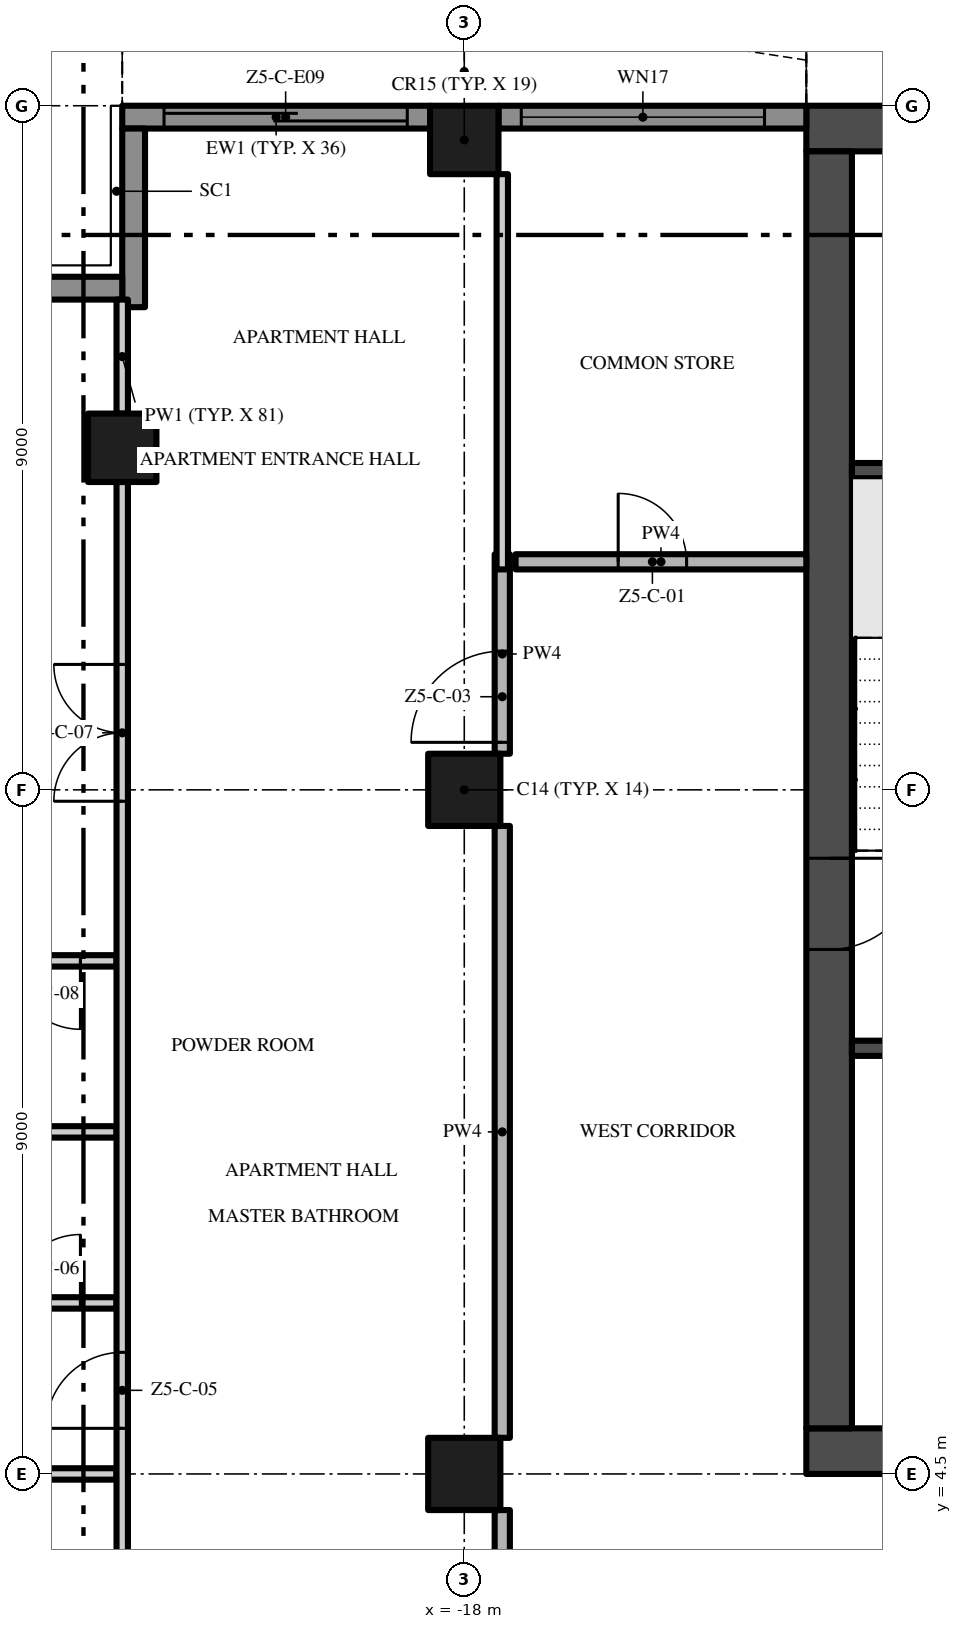
"""IFC4 building model, lengths in metres.
Left out: names, types, materials, properties, quantities, classifications, styles, units other than length and angle.
Written with IfcOpenShell. Run it as: python <this file> out.ifc"""

import sys

from ifc_helpers import new_model, si_unit, direction, frame, frame_2d, origin, origin_2d, place, context, subcontext, project, spatial, polyline, rectangle, outline, extrude, element, fill, save


model = new_model("IFC4")
c1 = context("Model", 3, precision=1e-05, world=origin(), true_north=direction((0.0, 1.0)))
c2 = subcontext(c1, "Body", "Model", "MODEL_VIEW")
j1 = project(units=[si_unit("LENGTHUNIT", "METRE"), si_unit("PLANEANGLEUNIT", "RADIAN")], contexts=[c1])
p1 = place(None, origin())
s1 = spatial("IfcSite", under=j1, at=p1, CompositionType="ELEMENT")
p2 = place(p1, origin())
s2 = spatial("IfcBuilding", under=s1, at=p2, CompositionType="ELEMENT")
p3 = place(p2, frame((0.0, 0.0, 265.4)))
s3 = spatial("IfcBuildingStorey", under=s2, at=p3, CompositionType="ELEMENT", Elevation=265.4)
p4 = place(p3, frame((-13.5, 4.8, -0.3), z_axis=(0.0, 0.0, 1.0), x_axis=(1.0, 0.0, 0.0)))
e1 = element("IfcWall", 1, at=p4, inside=s3, PredefinedType="SHEAR", context=c2, shape_type="SweptSolid", body=[
    extrude(rectangle(XDim=27.0, YDim=0.6, at=frame_2d((13.5, 0.0))), origin(), (0.0, 0.0, 1.0), 3.8),
])
p5 = place(p4, frame((12.0, 0.0, 0.3)))
e2 = element("IfcOpeningElement", 2, at=p5, cuts=e1, PredefinedType="OPENING", context=c2, shape_type="SweptSolid", body=[
    extrude(rectangle(XDim=3.0, YDim=2.4, at=frame_2d((1.5, 1.2))), frame((0.0, 0.31, 0.0), z_axis=(0.0, -1.0, 0.0), x_axis=(1.0, 0.0, 0.0)), (0.0, 0.0, 1.0), 0.62),
])
p6 = place(p4, frame((4.9, 0.0, 0.3)))
e3 = element("IfcOpeningElement", 3, at=p6, cuts=e1, PredefinedType="OPENING", context=c2, shape_type="SweptSolid", body=[
    extrude(rectangle(XDim=1.2, YDim=2.2, at=frame_2d((0.6, 1.1))), frame((0.0, 0.31, 0.0), z_axis=(0.0, -1.0, 0.0), x_axis=(1.0, 0.0, 0.0)), (0.0, 0.0, 1.0), 0.62),
])
p7 = place(p4, frame((20.75, 0.0, 0.3)))
e4 = element("IfcOpeningElement", 4, at=p7, cuts=e1, PredefinedType="OPENING", context=c2, shape_type="SweptSolid", body=[
    extrude(rectangle(XDim=1.5, YDim=2.2, at=frame_2d((0.75, 1.1))), frame((0.0, 0.31, 0.0), z_axis=(0.0, -1.0, 0.0), x_axis=(1.0, 0.0, 0.0)), (0.0, 0.0, 1.0), 0.62),
])
p8 = place(p4, frame((17.4, 0.0, 0.3)))
e5 = element("IfcOpeningElement", 5, at=p8, cuts=e1, PredefinedType="OPENING", context=c2, shape_type="SweptSolid", body=[
    extrude(rectangle(XDim=1.2, YDim=2.2, at=frame_2d((0.6, 1.1))), frame((0.0, 0.31, 0.0), z_axis=(0.0, -1.0, 0.0), x_axis=(1.0, 0.0, 0.0)), (0.0, 0.0, 1.0), 0.62),
])
p9 = place(p3, frame((13.5, 22.2, -0.3), z_axis=(0.0, 0.0, 1.0), x_axis=(-1.0, 0.0, 0.0)))
e6 = element("IfcWall", 6, at=p9, inside=s3, PredefinedType="SHEAR", context=c2, shape_type="SweptSolid", body=[
    extrude(rectangle(XDim=27.0, YDim=0.6, at=frame_2d((13.5, 0.0))), origin(), (0.0, 0.0, 1.0), 3.8),
])
p10 = place(p3, frame((-13.2, 21.9, -0.3), z_axis=(0.0, 0.0, 1.0), x_axis=(0.0, -1.0, 0.0)))
e7 = element("IfcWall", 7, at=p10, inside=s3, PredefinedType="SHEAR", context=c2, shape_type="SweptSolid", body=[
    extrude(rectangle(XDim=16.8, YDim=0.6, at=frame_2d((8.4, 0.0))), origin(), (0.0, 0.0, 1.0), 3.8),
])
p11 = place(p10, frame((9.3, 0.0, 0.3)))
e8 = element("IfcOpeningElement", 8, at=p11, cuts=e7, PredefinedType="OPENING", context=c2, shape_type="SweptSolid", body=[
    extrude(rectangle(XDim=1.2, YDim=2.2, at=frame_2d((0.6, 1.1))), frame((0.0, 0.31, 0.0), z_axis=(0.0, -1.0, 0.0), x_axis=(1.0, 0.0, 0.0)), (0.0, 0.0, 1.0), 0.62),
])
p12 = place(p3, frame((-18.0, 13.5, 0.0), z_axis=(0.0, 0.0, 1.0), x_axis=(1.0, 0.0, 0.0)))
e9 = element("IfcColumn", 9, at=p12, inside=s3, PredefinedType="COLUMN", context=c2, shape_type="SweptSolid", body=[
    extrude(rectangle(XDim=0.95, YDim=0.95, at=origin_2d()), origin(), (0.0, 0.0, 1.0), 3.5),
])
p13 = place(p3, frame((-18.0, 22.05, 0.0), z_axis=(0.0, 0.0, 1.0), x_axis=(1.0, 0.0, 0.0)))
e10 = element("IfcColumn", 10, at=p13, inside=s3, PredefinedType="COLUMN", context=c2, shape_type="SweptSolid", body=[
    extrude(rectangle(XDim=0.9, YDim=0.9, at=origin_2d()), origin(), (0.0, 0.0, 1.0), 3.5),
])
p14 = place(p3, frame((-18.0, 4.5, 0.0), z_axis=(0.0, 0.0, 1.0), x_axis=(1.0, 0.0, 0.0)))
e11 = element("IfcColumn", 11, at=p14, inside=s3, PredefinedType="COLUMN", context=c2, shape_type="SweptSolid", body=[
    extrude(rectangle(XDim=0.95, YDim=0.95, at=origin_2d()), origin(), (0.0, 0.0, 1.0), 3.5),
])
p15 = place(p3, frame((-22.5, 18.0, 0.0), z_axis=(0.0, 0.0, 1.0), x_axis=(1.0, 0.0, 0.0)))
e12 = element("IfcColumn", 12, at=p15, inside=s3, PredefinedType="COLUMN", context=c2, shape_type="SweptSolid", body=[
    extrude(rectangle(XDim=0.9, YDim=0.9, at=origin_2d()), origin(), (0.0, 0.0, 1.0), 3.5),
])
p16 = place(p3, frame((-17.55, 22.35, 0.0), z_axis=(0.0, 0.0, 1.0), x_axis=(1.0, 0.0, 0.0)))
e13 = element("IfcWall", 13, at=p16, inside=s3, PredefinedType="SOLIDWALL", context=c2, shape_type="SweptSolid", body=[
    extrude(rectangle(XDim=4.05, YDim=0.3, at=frame_2d((2.025, 0.0))), origin(), (0.0, 0.0, 1.0), 3.5),
])
p17 = place(p16, frame((0.3, 0.0, 0.45)))
e14 = element("IfcOpeningElement", 14, at=p17, cuts=e13, PredefinedType="OPENING", context=c2, shape_type="SweptSolid", body=[
    extrude(rectangle(XDim=3.2, YDim=2.65, at=frame_2d((1.6, 1.325))), frame((0.0, 0.16, 0.0), z_axis=(0.0, -1.0, 0.0), x_axis=(1.0, 0.0, 0.0)), (0.0, 0.0, 1.0), 0.32),
])
p18 = place(p3, frame((-22.5, 22.35, 0.0), z_axis=(0.0, 0.0, 1.0), x_axis=(1.0, 0.0, 0.0)))
e15 = element("IfcWall", 15, at=p18, inside=s3, PredefinedType="SOLIDWALL", context=c2, shape_type="SweptSolid", body=[
    extrude(rectangle(XDim=4.05, YDim=0.3, at=frame_2d((2.025, 0.0))), origin(), (0.0, 0.0, 1.0), 3.5),
])
p19 = place(p18, frame((0.55, 0.0, 0.0)))
e16 = element("IfcOpeningElement", 16, at=p19, cuts=e15, PredefinedType="OPENING", context=c2, shape_type="SweptSolid", body=[
    extrude(rectangle(XDim=3.2, YDim=2.4, at=frame_2d((1.6, 1.2))), frame((0.0, 0.16, 0.0), z_axis=(0.0, -1.0, 0.0), x_axis=(1.0, 0.0, 0.0)), (0.0, 0.0, 1.0), 0.32),
])
p20 = place(p3, frame((-22.35, 19.85, 0.0), z_axis=(0.0, 0.0, 1.0), x_axis=(0.0, 1.0, 0.0)))
e17 = element("IfcWall", 17, at=p20, inside=s3, PredefinedType="SOLIDWALL", context=c2, shape_type="SweptSolid", body=[
    extrude(rectangle(XDim=2.35, YDim=0.3, at=frame_2d((1.175, 0.0))), origin(), (0.0, 0.0, 1.0), 3.5),
])
p21 = place(p3, frame((-24.75, 20.1, 0.0), z_axis=(0.0, 0.0, 1.0), x_axis=(1.0, 0.0, 0.0)))
e18 = element("IfcWall", 18, at=p21, inside=s3, PredefinedType="SOLIDWALL", context=c2, shape_type="SweptSolid", body=[
    extrude(rectangle(XDim=2.25, YDim=0.3, at=frame_2d((1.125, 0.0))), origin(), (0.0, 0.0, 1.0), 3.5),
])
p22 = place(p3, origin())
e19 = element("IfcWall", 19, at=p22, inside=s3, PredefinedType="USERDEFINED", context=c2, shape_type="SweptSolid", body=[
    extrude(outline(polyline([(-13.5, 23.1), (-15.0, 23.329), (-16.5, 23.929), (-18.0, 24.671), (-19.5, 25.271), (-21.0, 25.5), (-22.5, 25.271), (-22.462, 25.024), (-21.0, 25.247), (-19.566, 25.028), (-18.102, 24.442), (-16.602, 23.701), (-15.066, 23.086), (-13.538, 22.853), (-13.5, 23.1)])), origin(), (0.0, 0.0, 1.0), 0.9),
])
for number, where, z_axis, x_axis in (
    (20, (-12.9, 10.1, 0.0), (0.0, 0.0, 1.0), (1.0, 0.0, 0.0)),
    (21, (-12.9, 17.7, 0.0), (0.0, 0.0, 1.0), (1.0, 0.0, 0.0)),
):
    element("IfcWall", number, at=place(p3, frame(where, z_axis=z_axis, x_axis=x_axis)), inside=s3, PredefinedType="SHEAR", context=c2, shape_type="SweptSolid", body=[
        extrude(rectangle(XDim=3.25, YDim=0.2, at=frame_2d((1.625, 0.0))), origin(), (0.0, 0.0, 1.0), 3.5),
    ])
p23 = place(p3, frame((-26.1, 4.5, 0.0), z_axis=(0.0, 0.0, 1.0), x_axis=(1.0, 0.0, 0.0)))
e22 = element("IfcWall", 22, at=p23, inside=s3, PredefinedType="PARTITIONING", context=c2, shape_type="SweptSolid", body=[
    extrude(rectangle(XDim=3.525, YDim=0.15, at=frame_2d((1.762, 0.0))), origin(), (0.0, 0.0, 1.0), 3.5),
])
p24 = place(p3, frame((-24.45, 6.75, 0.0), z_axis=(0.0, 0.0, 1.0), x_axis=(1.0, 0.0, 0.0)))
e23 = element("IfcWall", 23, at=p24, inside=s3, PredefinedType="PARTITIONING", context=c2, shape_type="SweptSolid", body=[
    extrude(rectangle(XDim=1.875, YDim=0.15, at=frame_2d((0.938, 0.0))), origin(), (0.0, 0.0, 1.0), 3.5),
])
p25 = place(p24, frame((0.5, 0.0, 0.0)))
e24 = element("IfcOpeningElement", 24, at=p25, cuts=e23, PredefinedType="OPENING", context=c2, shape_type="SweptSolid", body=[
    extrude(rectangle(XDim=0.9, YDim=2.1, at=frame_2d((0.45, 1.05))), frame((0.0, 0.085, 0.0), z_axis=(0.0, -1.0, 0.0), x_axis=(1.0, 0.0, 0.0)), (0.0, 0.0, 1.0), 0.17),
])
p26 = place(p3, frame((-24.45, 9.0, 0.0), z_axis=(0.0, 0.0, 1.0), x_axis=(1.0, 0.0, 0.0)))
e25 = element("IfcWall", 25, at=p26, inside=s3, PredefinedType="PARTITIONING", context=c2, shape_type="SweptSolid", body=[
    extrude(rectangle(XDim=1.875, YDim=0.15, at=frame_2d((0.938, 0.0))), origin(), (0.0, 0.0, 1.0), 3.5),
])
p27 = place(p3, frame((-22.575, 11.25, 0.0), z_axis=(0.0, 0.0, 1.0), x_axis=(-1.0, 0.0, 0.0)))
e26 = element("IfcWall", 26, at=p27, inside=s3, PredefinedType="PARTITIONING", context=c2, shape_type="SweptSolid", body=[
    extrude(rectangle(XDim=1.875, YDim=0.15, at=frame_2d((0.938, 0.0))), origin(), (0.0, 0.0, 1.0), 3.5),
])
p28 = place(p27, frame((0.475, 0.0, 0.0)))
e27 = element("IfcOpeningElement", 27, at=p28, cuts=e26, PredefinedType="OPENING", context=c2, shape_type="SweptSolid", body=[
    extrude(rectangle(XDim=0.9, YDim=2.1, at=frame_2d((0.45, 1.05))), frame((0.0, 0.085, 0.0), z_axis=(0.0, -1.0, 0.0), x_axis=(1.0, 0.0, 0.0)), (0.0, 0.0, 1.0), 0.17),
])
p29 = place(p3, frame((-17.325, 16.5, 0.0), z_axis=(0.0, 0.0, 1.0), x_axis=(1.0, 0.0, 0.0)))
e28 = element("IfcWall", 28, at=p29, inside=s3, PredefinedType="PARTITIONING", context=c2, shape_type="SweptSolid", body=[
    extrude(rectangle(XDim=3.825, YDim=0.2, at=frame_2d((1.913, 0.0))), origin(), (0.0, 0.0, 1.0), 3.5),
])
p30 = place(p29, frame((1.35, 0.0, 0.0)))
e29 = element("IfcOpeningElement", 29, at=p30, cuts=e28, PredefinedType="OPENING", context=c2, shape_type="SweptSolid", body=[
    extrude(rectangle(XDim=0.9, YDim=2.1, at=frame_2d((0.45, 1.05))), frame((0.0, 0.11, 0.0), z_axis=(0.0, -1.0, 0.0), x_axis=(1.0, 0.0, 0.0)), (0.0, 0.0, 1.0), 0.22),
])
p31 = place(p3, frame((-22.5, 0.1, 0.0), z_axis=(0.0, 0.0, 1.0), x_axis=(0.0, 1.0, 0.0)))
e30 = element("IfcWall", 30, at=p31, inside=s3, PredefinedType="PARTITIONING", context=c2, shape_type="SweptSolid", body=[
    extrude(rectangle(XDim=17.45, YDim=0.15, at=frame_2d((8.725, 0.0))), origin(), (0.0, 0.0, 1.0), 3.5),
])
p32 = place(p31, frame((1.65, 0.0, 0.0)))
e31 = element("IfcOpeningElement", 31, at=p32, cuts=e30, PredefinedType="OPENING", context=c2, shape_type="SweptSolid", body=[
    extrude(rectangle(XDim=1.0, YDim=2.4, at=frame_2d((0.5, 1.2))), frame((0.0, 0.085, 0.0), z_axis=(0.0, -1.0, 0.0), x_axis=(1.0, 0.0, 0.0)), (0.0, 0.0, 1.0), 0.17),
])
p33 = place(p31, frame((5.0, 0.0, 0.0)))
e32 = element("IfcOpeningElement", 32, at=p33, cuts=e30, PredefinedType="OPENING", context=c2, shape_type="SweptSolid", body=[
    extrude(rectangle(XDim=1.0, YDim=2.4, at=frame_2d((0.5, 1.2))), frame((0.0, 0.085, 0.0), z_axis=(0.0, -1.0, 0.0), x_axis=(1.0, 0.0, 0.0)), (0.0, 0.0, 1.0), 0.17),
])
p34 = place(p31, frame((13.25, 0.0, 0.0)))
e33 = element("IfcOpeningElement", 33, at=p34, cuts=e30, PredefinedType="OPENING", context=c2, shape_type="SweptSolid", body=[
    extrude(rectangle(XDim=1.8, YDim=2.4, at=frame_2d((0.9, 1.2))), frame((0.0, 0.085, 0.0), z_axis=(0.0, -1.0, 0.0), x_axis=(1.0, 0.0, 0.0)), (0.0, 0.0, 1.0), 0.17),
])
p35 = place(p3, frame((-22.5, 18.45, 0.0), z_axis=(0.0, 0.0, 1.0), x_axis=(0.0, 1.0, 0.0)))
e34 = element("IfcWall", 34, at=p35, inside=s3, PredefinedType="PARTITIONING", context=c2, shape_type="SweptSolid", body=[
    extrude(rectangle(XDim=1.5, YDim=0.15, at=frame_2d((0.75, 0.0))), origin(), (0.0, 0.0, 1.0), 3.5),
])
p36 = place(p3, frame((-17.5, -0.2, 0.0), z_axis=(0.0, 0.0, 1.0), x_axis=(0.0, 1.0, 0.0)))
e35 = element("IfcWall", 35, at=p36, inside=s3, PredefinedType="PARTITIONING", context=c2, shape_type="SweptSolid", body=[
    extrude(rectangle(XDim=4.225, YDim=0.2, at=frame_2d((2.112, 0.0))), origin(), (0.0, 0.0, 1.0), 3.5),
])
p37 = place(p3, frame((-17.5, 4.975, 0.0), z_axis=(0.0, 0.0, 1.0), x_axis=(0.0, 1.0, 0.0)))
e36 = element("IfcWall", 36, at=p37, inside=s3, PredefinedType="PARTITIONING", context=c2, shape_type="SweptSolid", body=[
    extrude(rectangle(XDim=8.05, YDim=0.2, at=frame_2d((4.025, 0.0))), origin(), (0.0, 0.0, 1.0), 3.5),
])
p38 = place(p3, frame((-17.5, 13.975, 0.0), z_axis=(0.0, 0.0, 1.0), x_axis=(0.0, 1.0, 0.0)))
e37 = element("IfcWall", 37, at=p38, inside=s3, PredefinedType="PARTITIONING", context=c2, shape_type="SweptSolid", body=[
    extrude(rectangle(XDim=2.625, YDim=0.2, at=frame_2d((1.312, 0.0))), origin(), (0.0, 0.0, 1.0), 3.5),
])
p39 = place(p38, frame((0.15, 0.0, 0.0)))
e38 = element("IfcOpeningElement", 38, at=p39, cuts=e37, PredefinedType="OPENING", context=c2, shape_type="SweptSolid", body=[
    extrude(rectangle(XDim=1.2, YDim=2.4, at=frame_2d((0.6, 1.2))), frame((0.0, 0.11, 0.0), z_axis=(0.0, -1.0, 0.0), x_axis=(1.0, 0.0, 0.0)), (0.0, 0.0, 1.0), 0.22),
])
p40 = place(p3, frame((-17.5, 16.4, 0.0), z_axis=(0.0, 0.0, 1.0), x_axis=(0.0, 1.0, 0.0)))
e39 = element("IfcWall", 39, at=p40, inside=s3, PredefinedType="PARTITIONING", context=c2, shape_type="SweptSolid", body=[
    extrude(rectangle(XDim=5.2, YDim=0.15, at=frame_2d((2.6, 0.0))), origin(), (0.0, 0.0, 1.0), 3.5),
])
p41 = place(p17, origin())
e40 = element("IfcWindow", 40, at=p41, inside=s3, PartitioningType="SINGLE_PANEL", PredefinedType="WINDOW", context=c2, shape_type="SweptSolid", body=[
    extrude(rectangle(XDim=3.2, YDim=2.65, at=frame_2d((1.6, 1.325))), frame((0.0, 0.03, 0.0), z_axis=(0.0, -1.0, 0.0), x_axis=(1.0, 0.0, 0.0)), (0.0, 0.0, 1.0), 0.06),
])
fill(e14, e40)
p42 = place(p19, origin())
e41 = element("IfcDoor", 41, at=p42, inside=s3, OperationType="SINGLE_SWING_LEFT", PredefinedType="DOOR", context=c2, shape_type="SweptSolid", body=[
    extrude(rectangle(XDim=3.2, YDim=2.4, at=frame_2d((1.6, 1.2))), frame((0.0, 0.025, 0.0), z_axis=(0.0, -1.0, 0.0), x_axis=(1.0, 0.0, 0.0)), (0.0, 0.0, 1.0), 0.05),
])
fill(e16, e41)
p43 = place(p11, frame((1.2, 0.0, 0.0), z_axis=(0.0, 0.0, 1.0), x_axis=(-1.0, 0.0, 0.0)))
e42 = element("IfcDoor", 42, at=p43, inside=s3, OperationType="SINGLE_SWING_RIGHT", PredefinedType="DOOR", context=c2, shape_type="SweptSolid", body=[
    extrude(rectangle(XDim=1.2, YDim=2.2, at=frame_2d((0.6, 1.1))), frame((0.0, 0.025, 0.0), z_axis=(0.0, -1.0, 0.0), x_axis=(1.0, 0.0, 0.0)), (0.0, 0.0, 1.0), 0.05),
])
fill(e8, e42)
p44 = place(p30, origin())
e43 = element("IfcDoor", 43, at=p44, inside=s3, OperationType="SINGLE_SWING_LEFT", PredefinedType="DOOR", context=c2, shape_type="SweptSolid", body=[
    extrude(rectangle(XDim=0.9, YDim=2.1, at=frame_2d((0.45, 1.05))), frame((0.0, 0.025, 0.0), z_axis=(0.0, -1.0, 0.0), x_axis=(1.0, 0.0, 0.0)), (0.0, 0.0, 1.0), 0.05),
])
fill(e29, e43)
p45 = place(p39, origin())
e44 = element("IfcDoor", 44, at=p45, inside=s3, OperationType="SINGLE_SWING_LEFT", PredefinedType="DOOR", context=c2, shape_type="SweptSolid", body=[
    extrude(rectangle(XDim=1.2, YDim=2.4, at=frame_2d((0.6, 1.2))), frame((0.0, 0.025, 0.0), z_axis=(0.0, -1.0, 0.0), x_axis=(1.0, 0.0, 0.0)), (0.0, 0.0, 1.0), 0.05),
])
fill(e38, e44)
p46 = place(p33, origin())
e45 = element("IfcDoor", 45, at=p46, inside=s3, OperationType="SINGLE_SWING_LEFT", PredefinedType="DOOR", context=c2, shape_type="SweptSolid", body=[
    extrude(rectangle(XDim=1.0, YDim=2.4, at=frame_2d((0.5, 1.2))), frame((0.0, 0.025, 0.0), z_axis=(0.0, -1.0, 0.0), x_axis=(1.0, 0.0, 0.0)), (0.0, 0.0, 1.0), 0.05),
])
fill(e32, e45)
p47 = place(p25, origin())
e46 = element("IfcDoor", 46, at=p47, inside=s3, OperationType="SINGLE_SWING_RIGHT", PredefinedType="DOOR", context=c2, shape_type="SweptSolid", body=[
    extrude(rectangle(XDim=0.9, YDim=2.1, at=frame_2d((0.45, 1.05))), frame((0.0, 0.025, 0.0), z_axis=(0.0, -1.0, 0.0), x_axis=(1.0, 0.0, 0.0)), (0.0, 0.0, 1.0), 0.05),
])
fill(e24, e46)
p48 = place(p34, origin())
e47 = element("IfcDoor", 47, at=p48, inside=s3, OperationType="DOUBLE_DOOR_SINGLE_SWING", PredefinedType="DOOR", context=c2, shape_type="SweptSolid", body=[
    extrude(rectangle(XDim=1.8, YDim=2.4, at=frame_2d((0.9, 1.2))), frame((0.0, 0.025, 0.0), z_axis=(0.0, -1.0, 0.0), x_axis=(1.0, 0.0, 0.0)), (0.0, 0.0, 1.0), 0.05),
])
fill(e33, e47)
p49 = place(p28, origin())
e48 = element("IfcDoor", 48, at=p49, inside=s3, OperationType="SINGLE_SWING_LEFT", PredefinedType="DOOR", context=c2, shape_type="SweptSolid", body=[
    extrude(rectangle(XDim=0.9, YDim=2.1, at=frame_2d((0.45, 1.05))), frame((0.0, 0.025, 0.0), z_axis=(0.0, -1.0, 0.0), x_axis=(1.0, 0.0, 0.0)), (0.0, 0.0, 1.0), 0.05),
])
fill(e27, e48)
save(model, sys.argv[1])
